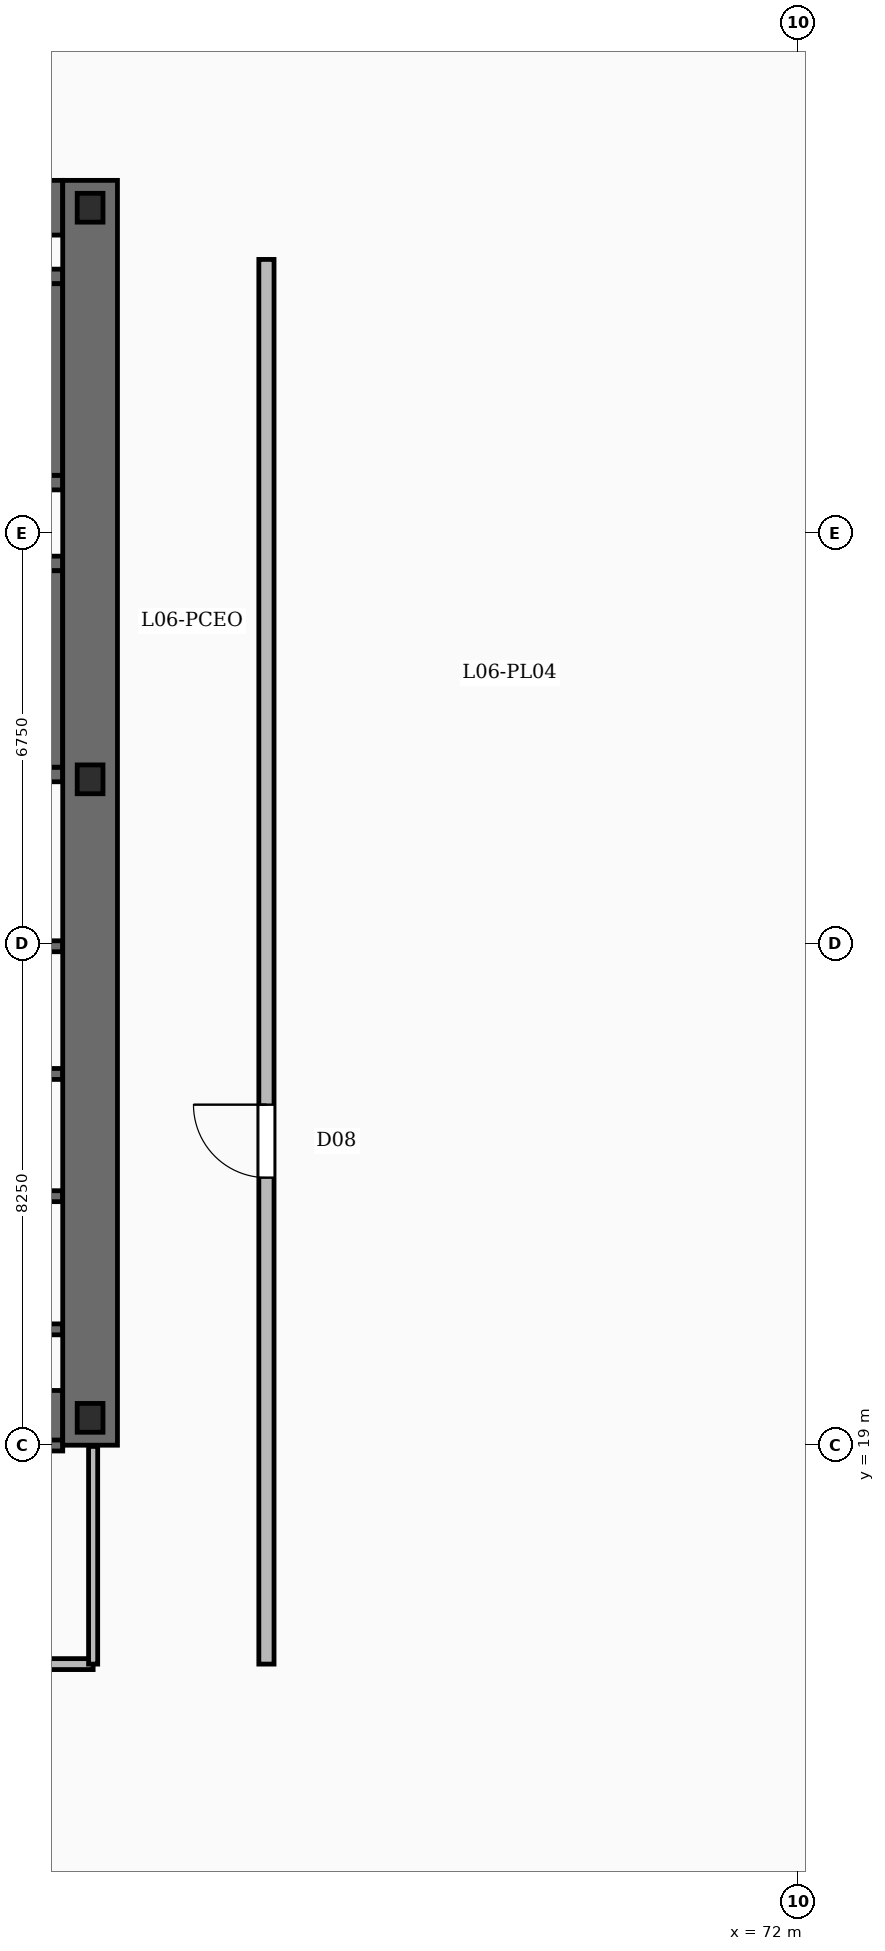
"""IFC4 building model, lengths in metres.
Left out: names, types, materials, properties, quantities, classifications, styles, units other than length and angle.
Written with IfcOpenShell. Run it as: python <this file> out.ifc"""

import sys

from ifc_helpers import new_model, si_unit, direction, frame, frame_2d, origin, origin_2d, place, context, subcontext, project, spatial, rectangle, i_section, extrude, element, fill, save


model = new_model("IFC4")
c1 = context("Model", 3, precision=1e-05, world=origin(), true_north=direction((0.0, 1.0)))
c2 = subcontext(c1, "Body", "Model", "MODEL_VIEW")
j1 = project(units=[si_unit("LENGTHUNIT", "METRE"), si_unit("PLANEANGLEUNIT", "RADIAN")], contexts=[c1])
p1 = place(None, origin())
s1 = spatial("IfcSite", under=j1, at=p1, CompositionType="ELEMENT")
p2 = place(p1, origin())
s2 = spatial("IfcBuilding", under=s1, at=p2, CompositionType="ELEMENT")
p3 = place(p2, frame((0.0, 0.0, 34.0)))
s3 = spatial("IfcBuildingStorey", under=s2, at=p3, CompositionType="ELEMENT", Elevation=34.0)
p4 = place(p3, frame((60.35, 19.0, -0.45), z_axis=(0.0, 0.0, 1.0), x_axis=(0.0, 1.0, 0.0)))
e1 = element("IfcWall", 1, at=p4, inside=s3, PredefinedType="SHEAR", context=c2, shape_type="SweptSolid", body=[
    extrude(rectangle(XDim=20.8, YDim=0.9, at=frame_2d((10.4, 0.0))), origin(), (0.0, 0.0, 1.0), 8.0),
])
for number, where, z_axis, x_axis in (
    (2, (51.0, 19.45, -0.45), (0.0, 0.0, 1.0), (1.0, 0.0, 0.0)),
    (3, (51.0, 39.35, -0.45), (0.0, 0.0, 1.0), (1.0, 0.0, 0.0)),
):
    element("IfcWall", number, at=place(p3, frame(where, z_axis=z_axis, x_axis=x_axis)), inside=s3, PredefinedType="SHEAR", context=c2, shape_type="SweptSolid", body=[
        extrude(rectangle(XDim=8.9, YDim=0.9, at=frame_2d((4.45, 0.0))), origin(), (0.0, 0.0, 1.0), 8.0),
    ])
for number, where, z_axis, x_axis in (
    (4, (60.35, 19.45, -0.45), (0.0, 0.0, 1.0), (1.0, 0.0, 0.0)),
    (5, (60.35, 29.95, -0.45), (0.0, 0.0, 1.0), (1.0, 0.0, 0.0)),
    (6, (60.35, 39.35, -0.45), (0.0, 0.0, 1.0), (1.0, 0.0, 0.0)),
):
    element("IfcColumn", number, at=place(p3, frame(where, z_axis=z_axis, x_axis=x_axis)), inside=s3, PredefinedType="COLUMN", context=c2, shape_type="SweptSolid", body=[
        extrude(i_section(OverallWidth=0.424, OverallDepth=0.474, WebThickness=0.048, FlangeThickness=0.077, FilletRadius=0.02, at=origin_2d()), origin(), (0.0, 0.0, 1.0), 8.0),
    ])
p5 = place(p3, frame((59.9, 30.03, 0.0), z_axis=(0.0, 0.0, 1.0), x_axis=(-1.0, 0.0, 0.0)))
e7 = element("IfcWall", 7, at=p5, inside=s3, PredefinedType="SOLIDWALL", context=c2, shape_type="SweptSolid", body=[
    extrude(rectangle(XDim=8.9, YDim=0.24, at=frame_2d((4.45, 0.0))), origin(), (0.0, 0.0, 1.0), 7.55),
])
p6 = place(p5, frame((7.38, 0.0, 0.0)))
e8 = element("IfcOpeningElement", 8, at=p6, cuts=e7, PredefinedType="OPENING", context=c2, shape_type="SweptSolid", body=[
    extrude(rectangle(XDim=1.1, YDim=2.15, at=frame_2d((0.55, 1.075))), frame((0.0, 0.13, 0.0), z_axis=(0.0, -1.0, 0.0), x_axis=(1.0, 0.0, 0.0)), (0.0, 0.0, 1.0), 0.26),
])
p7 = place(p3, frame((51.0, 33.5, 0.0), z_axis=(0.0, 0.0, 1.0), x_axis=(1.0, 0.0, 0.0)))
e9 = element("IfcWall", 9, at=p7, inside=s3, PredefinedType="SOLIDWALL", context=c2, shape_type="SweptSolid", body=[
    extrude(rectangle(XDim=8.9, YDim=0.24, at=frame_2d((4.45, 0.0))), origin(), (0.0, 0.0, 1.0), 7.55),
])
p8 = place(p3, frame((59.78, 30.15, 0.0), z_axis=(0.0, 0.0, 1.0), x_axis=(0.0, 1.0, 0.0)))
e10 = element("IfcWall", 10, at=p8, inside=s3, PredefinedType="SOLIDWALL", context=c2, shape_type="SweptSolid", body=[
    extrude(rectangle(XDim=3.23, YDim=0.24, at=frame_2d((1.615, 0.0))), origin(), (0.0, 0.0, 1.0), 7.55),
])
p9 = place(p3, frame((59.9, 34.83, 0.0), z_axis=(0.0, 0.0, 1.0), x_axis=(-1.0, 0.0, 0.0)))
e11 = element("IfcWall", 11, at=p9, inside=s3, PredefinedType="SOLIDWALL", context=c2, shape_type="SweptSolid", body=[
    extrude(rectangle(XDim=8.9, YDim=0.24, at=frame_2d((4.45, 0.0))), origin(), (0.0, 0.0, 1.0), 7.55),
])
p10 = place(p9, frame((7.42, 0.0, 0.0)))
e12 = element("IfcOpeningElement", 12, at=p10, cuts=e11, PredefinedType="OPENING", context=c2, shape_type="SweptSolid", body=[
    extrude(rectangle(XDim=1.1, YDim=2.15, at=frame_2d((0.55, 1.075))), frame((0.0, 0.13, 0.0), z_axis=(0.0, -1.0, 0.0), x_axis=(1.0, 0.0, 0.0)), (0.0, 0.0, 1.0), 0.26),
])
p11 = place(p3, frame((51.0, 38.22, 0.0), z_axis=(0.0, 0.0, 1.0), x_axis=(1.0, 0.0, 0.0)))
e13 = element("IfcWall", 13, at=p11, inside=s3, PredefinedType="SOLIDWALL", context=c2, shape_type="SweptSolid", body=[
    extrude(rectangle(XDim=8.9, YDim=0.24, at=frame_2d((4.45, 0.0))), origin(), (0.0, 0.0, 1.0), 7.55),
])
p12 = place(p3, frame((59.78, 34.95, 0.0), z_axis=(0.0, 0.0, 1.0), x_axis=(0.0, 1.0, 0.0)))
e14 = element("IfcWall", 14, at=p12, inside=s3, PredefinedType="SOLIDWALL", context=c2, shape_type="SweptSolid", body=[
    extrude(rectangle(XDim=3.15, YDim=0.24, at=frame_2d((1.575, 0.0))), origin(), (0.0, 0.0, 1.0), 7.55),
])
for number, where, z_axis, x_axis in (
    (15, (56.44, 20.905, 0.0), (0.0, 0.0, 1.0), (1.0, 0.0, 0.0)),
    (16, (56.44, 18.995, 0.0), (0.0, 0.0, 1.0), (1.0, 0.0, 0.0)),
    (17, (56.44, 25.105, 0.0), (0.0, 0.0, 1.0), (1.0, 0.0, 0.0)),
    (18, (56.44, 23.095, 0.0), (0.0, 0.0, 1.0), (1.0, 0.0, 0.0)),
    (19, (56.44, 27.205, 0.0), (0.0, 0.0, 1.0), (1.0, 0.0, 0.0)),
):
    element("IfcWall", number, at=place(p3, frame(where, z_axis=z_axis, x_axis=x_axis)), inside=s3, PredefinedType="SOLIDWALL", context=c2, shape_type="SweptSolid", body=[
        extrude(rectangle(XDim=3.46, YDim=0.18, at=frame_2d((1.73, 0.0))), origin(), (0.0, 0.0, 1.0), 7.55),
    ])
p13 = place(p3, frame((50.4, 15.4, 0.0), z_axis=(0.0, 0.0, 1.0), x_axis=(1.0, 0.0, 0.0)))
e20 = element("IfcWall", 20, at=p13, inside=s3, PredefinedType="SOLIDWALL", context=c2, shape_type="SweptSolid", body=[
    extrude(rectangle(XDim=10.0, YDim=0.18, at=frame_2d((5.0, 0.0))), origin(), (0.0, 0.0, 1.0), 6.61),
])
p14 = place(p13, frame((1.19, 0.0, 0.0)))
e21 = element("IfcOpeningElement", 21, at=p14, cuts=e20, PredefinedType="OPENING", context=c2, shape_type="SweptSolid", body=[
    extrude(rectangle(XDim=0.92, YDim=2.1, at=frame_2d((0.46, 1.05))), frame((0.0, 0.1, 0.0), z_axis=(0.0, -1.0, 0.0), x_axis=(1.0, 0.0, 0.0)), (0.0, 0.0, 1.0), 0.2),
])
p15 = place(p13, frame((4.54, 0.0, 0.0)))
e22 = element("IfcOpeningElement", 22, at=p15, cuts=e20, PredefinedType="OPENING", context=c2, shape_type="SweptSolid", body=[
    extrude(rectangle(XDim=0.92, YDim=2.1, at=frame_2d((0.46, 1.05))), frame((0.0, 0.1, 0.0), z_axis=(0.0, -1.0, 0.0), x_axis=(1.0, 0.0, 0.0)), (0.0, 0.0, 1.0), 0.2),
])
p16 = place(p13, frame((7.92, 0.0, 0.0)))
e23 = element("IfcOpeningElement", 23, at=p16, cuts=e20, PredefinedType="OPENING", context=c2, shape_type="SweptSolid", body=[
    extrude(rectangle(XDim=0.86, YDim=2.05, at=frame_2d((0.43, 1.025))), frame((0.0, 0.1, 0.0), z_axis=(0.0, -1.0, 0.0), x_axis=(1.0, 0.0, 0.0)), (0.0, 0.0, 1.0), 0.2),
])
p17 = place(p3, frame((60.4, 15.4, 0.0), z_axis=(0.0, 0.0, 1.0), x_axis=(0.0, 1.0, 0.0)))
e24 = element("IfcWall", 24, at=p17, inside=s3, PredefinedType="PARTITIONING", context=c2, shape_type="SweptSolid", body=[
    extrude(rectangle(XDim=3.58, YDim=0.15, at=frame_2d((1.79, 0.0))), origin(), (0.0, 0.0, 1.0), 6.61),
])
p18 = place(p3, frame((63.25, 15.4, 0.0), z_axis=(0.0, 0.0, 1.0), x_axis=(0.0, 1.0, 0.0)))
e25 = element("IfcWall", 25, at=p18, inside=s3, PredefinedType="SOLIDWALL", context=c2, shape_type="SweptSolid", body=[
    extrude(rectangle(XDim=23.1, YDim=0.25, at=frame_2d((11.55, 0.0))), origin(), (0.0, 0.0, 1.0), 6.61),
])
p19 = place(p18, frame((8.0, 0.0, 0.0)))
e26 = element("IfcOpeningElement", 26, at=p19, cuts=e25, PredefinedType="OPENING", context=c2, shape_type="SweptSolid", body=[
    extrude(rectangle(XDim=1.2, YDim=2.2, at=frame_2d((0.6, 1.1))), frame((0.0, 0.135, 0.0), z_axis=(0.0, -1.0, 0.0), x_axis=(1.0, 0.0, 0.0)), (0.0, 0.0, 1.0), 0.27),
])
p20 = place(p19, origin())
e27 = element("IfcDoor", 27, at=p20, inside=s3, OperationType="SINGLE_SWING_RIGHT", PredefinedType="DOOR", context=c2, shape_type="SweptSolid", body=[
    extrude(rectangle(XDim=1.2, YDim=2.2, at=frame_2d((0.6, 1.1))), frame((0.0, 0.025, 0.0), z_axis=(0.0, -1.0, 0.0), x_axis=(1.0, 0.0, 0.0)), (0.0, 0.0, 1.0), 0.05),
])
fill(e26, e27)
save(model, sys.argv[1])
